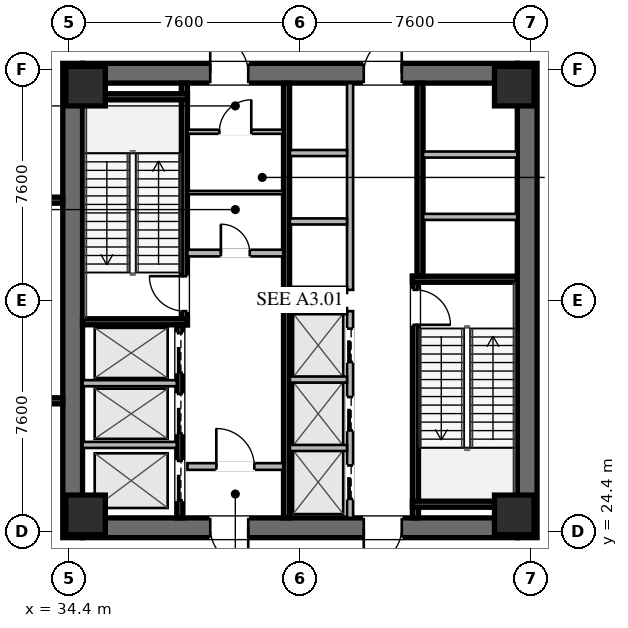
"""IFC4 building model, lengths in metres.
Left out: names, types, materials, properties, quantities, classifications, styles, units other than length and angle.
Written with IfcOpenShell. Run it as: python <this file> out.ifc"""

import sys

from ifc_helpers import new_model, si_unit, direction, frame, frame_2d, origin, origin_2d, place, context, subcontext, project, spatial, rectangle, hollow_rectangle, extrude, element, fill, save


model = new_model("IFC4")
c1 = context("Model", 3, precision=1e-05, world=origin(), true_north=direction((0.0, 1.0)))
c2 = subcontext(c1, "Body", "Model", "MODEL_VIEW")
j1 = project(units=[si_unit("LENGTHUNIT", "METRE"), si_unit("PLANEANGLEUNIT", "RADIAN")], contexts=[c1])
p1 = place(None, origin())
s1 = spatial("IfcSite", under=j1, at=p1, CompositionType="ELEMENT")
p2 = place(p1, origin())
s2 = spatial("IfcBuilding", under=s1, at=p2, CompositionType="ELEMENT")
p3 = place(p2, frame((0.0, 0.0, -11.0)))
s3 = spatial("IfcBuildingStorey", under=s2, at=p3, CompositionType="ELEMENT", Elevation=-11.0)
for number, where, z_axis, x_axis in (
    (1, (34.525, 24.2, 0.0), (0.0, 0.0, 1.0), (0.0, 1.0, 0.0)),
    (2, (49.475, 39.8, 0.0), (0.0, 0.0, 1.0), (0.0, -1.0, 0.0)),
):
    element("IfcWall", number, at=place(p3, frame(where, z_axis=z_axis, x_axis=x_axis)), inside=s3, PredefinedType="SHEAR", context=c2, shape_type="SweptSolid", body=[
        extrude(rectangle(XDim=15.6, YDim=0.65, at=frame_2d((7.8, 0.0))), origin(), (0.0, 0.0, 1.0), 5.5),
    ])
p4 = place(p3, frame((49.15, 24.525, 0.0), z_axis=(0.0, 0.0, 1.0), x_axis=(-1.0, 0.0, 0.0)))
e3 = element("IfcWall", 3, at=p4, inside=s3, PredefinedType="SHEAR", context=c2, shape_type="SweptSolid", body=[
    extrude(rectangle(XDim=14.3, YDim=0.65, at=frame_2d((7.15, 0.0))), origin(), (0.0, 0.0, 1.0), 5.5),
])
p5 = place(p4, frame((8.85, 0.0, 0.0)))
e4 = element("IfcOpeningElement", 4, at=p5, cuts=e3, PredefinedType="OPENING", context=c2, shape_type="SweptSolid", body=[
    extrude(rectangle(XDim=1.25, YDim=2.25, at=frame_2d((0.625, 1.125))), frame((0.0, 0.335, 0.0), z_axis=(0.0, -1.0, 0.0), x_axis=(1.0, 0.0, 0.0)), (0.0, 0.0, 1.0), 0.67),
])
p6 = place(p4, frame((3.8, 0.0, 0.0)))
e5 = element("IfcOpeningElement", 5, at=p6, cuts=e3, PredefinedType="OPENING", context=c2, shape_type="SweptSolid", body=[
    extrude(rectangle(XDim=1.25, YDim=2.25, at=frame_2d((0.625, 1.125))), frame((0.0, 0.335, 0.0), z_axis=(0.0, -1.0, 0.0), x_axis=(1.0, 0.0, 0.0)), (0.0, 0.0, 1.0), 0.67),
])
p7 = place(p3, frame((34.85, 39.475, 0.0), z_axis=(0.0, 0.0, 1.0), x_axis=(1.0, 0.0, 0.0)))
e6 = element("IfcWall", 6, at=p7, inside=s3, PredefinedType="SHEAR", context=c2, shape_type="SweptSolid", body=[
    extrude(rectangle(XDim=14.3, YDim=0.65, at=frame_2d((7.15, 0.0))), origin(), (0.0, 0.0, 1.0), 5.5),
])
p8 = place(p7, frame((4.2, 0.0, 0.0)))
e7 = element("IfcOpeningElement", 7, at=p8, cuts=e6, PredefinedType="OPENING", context=c2, shape_type="SweptSolid", body=[
    extrude(rectangle(XDim=1.25, YDim=2.25, at=frame_2d((0.625, 1.125))), frame((0.0, 0.335, 0.0), z_axis=(0.0, -1.0, 0.0), x_axis=(1.0, 0.0, 0.0)), (0.0, 0.0, 1.0), 0.67),
])
p9 = place(p7, frame((9.25, 0.0, 0.0)))
e8 = element("IfcOpeningElement", 8, at=p9, cuts=e6, PredefinedType="OPENING", context=c2, shape_type="SweptSolid", body=[
    extrude(rectangle(XDim=1.25, YDim=2.25, at=frame_2d((0.625, 1.125))), frame((0.0, 0.335, 0.0), z_axis=(0.0, -1.0, 0.0), x_axis=(1.0, 0.0, 0.0)), (0.0, 0.0, 1.0), 0.67),
])
for number, where, z_axis, x_axis in (
    (9, (34.95, 24.95, 0.0), (0.0, 0.0, 1.0), (1.0, 0.0, 0.0)),
    (10, (49.05, 24.95, 0.0), (0.0, 0.0, 1.0), (1.0, 0.0, 0.0)),
    (11, (49.05, 39.05, 0.0), (0.0, 0.0, 1.0), (1.0, 0.0, 0.0)),
    (12, (34.95, 39.05, 0.0), (0.0, 0.0, 1.0), (1.0, 0.0, 0.0)),
):
    element("IfcColumn", number, at=place(p3, frame(where, z_axis=z_axis, x_axis=x_axis)), inside=s3, PredefinedType="COLUMN", context=c2, shape_type="SweptSolid", body=[
        extrude(hollow_rectangle(XDim=1.3, YDim=1.3, WallThickness=0.05, at=origin_2d()), origin(), (0.0, 0.0, 1.0), 5.24),
    ])
p10 = place(p3, frame((38.2, 31.2, 0.0), z_axis=(0.0, 0.0, 1.0), x_axis=(0.0, 1.0, 0.0)))
e13 = element("IfcWall", 13, at=p10, inside=s3, PredefinedType="SHEAR", context=c2, shape_type="SweptSolid", body=[
    extrude(rectangle(XDim=7.95, YDim=0.2, at=frame_2d((3.975, 0.0))), origin(), (0.0, 0.0, 1.0), 5.24),
])
p11 = place(p10, frame((0.45, 0.0, 0.0)))
e14 = element("IfcOpeningElement", 14, at=p11, cuts=e13, PredefinedType="OPENING", context=c2, shape_type="SweptSolid", body=[
    extrude(rectangle(XDim=1.15, YDim=2.2, at=frame_2d((0.575, 1.1))), frame((0.0, 0.11, 0.0), z_axis=(0.0, -1.0, 0.0), x_axis=(1.0, 0.0, 0.0)), (0.0, 0.0, 1.0), 0.22),
])
for number, where, z_axis, x_axis in (
    (15, (34.85, 31.3, 0.0), (0.0, 0.0, 1.0), (1.0, 0.0, 0.0)),
    (16, (34.85, 38.7, 0.0), (0.0, 0.0, 1.0), (1.0, 0.0, 0.0)),
):
    element("IfcWall", number, at=place(p3, frame(where, z_axis=z_axis, x_axis=x_axis)), inside=s3, PredefinedType="SHEAR", context=c2, shape_type="SweptSolid", body=[
        extrude(rectangle(XDim=3.45, YDim=0.2, at=frame_2d((1.725, 0.0))), origin(), (0.0, 0.0, 1.0), 5.24),
    ])
p12 = place(p3, frame((45.8, 32.8, 0.0), z_axis=(0.0, 0.0, 1.0), x_axis=(0.0, -1.0, 0.0)))
e17 = element("IfcWall", 17, at=p12, inside=s3, PredefinedType="SHEAR", context=c2, shape_type="SweptSolid", body=[
    extrude(rectangle(XDim=7.95, YDim=0.2, at=frame_2d((3.975, 0.0))), origin(), (0.0, 0.0, 1.0), 5.24),
])
p13 = place(p12, frame((0.45, 0.0, 0.0)))
e18 = element("IfcOpeningElement", 18, at=p13, cuts=e17, PredefinedType="OPENING", context=c2, shape_type="SweptSolid", body=[
    extrude(rectangle(XDim=1.15, YDim=2.2, at=frame_2d((0.575, 1.1))), frame((0.0, 0.11, 0.0), z_axis=(0.0, -1.0, 0.0), x_axis=(1.0, 0.0, 0.0)), (0.0, 0.0, 1.0), 0.22),
])
for number, where, z_axis, x_axis in (
    (19, (45.7, 32.7, 0.0), (0.0, 0.0, 1.0), (1.0, 0.0, 0.0)),
    (20, (45.7, 25.3, 0.0), (0.0, 0.0, 1.0), (1.0, 0.0, 0.0)),
):
    element("IfcWall", number, at=place(p3, frame(where, z_axis=z_axis, x_axis=x_axis)), inside=s3, PredefinedType="SHEAR", context=c2, shape_type="SweptSolid", body=[
        extrude(rectangle(XDim=3.45, YDim=0.2, at=frame_2d((1.725, 0.0))), origin(), (0.0, 0.0, 1.0), 5.24),
    ])
p14 = place(p3, frame((41.56, 24.85, 0.0), z_axis=(0.0, 0.0, 1.0), x_axis=(0.0, 1.0, 0.0)))
e21 = element("IfcWall", 21, at=p14, inside=s3, PredefinedType="SHEAR", context=c2, shape_type="SweptSolid", body=[
    extrude(rectangle(XDim=14.3, YDim=0.2, at=frame_2d((7.15, 0.0))), origin(), (0.0, 0.0, 1.0), 5.24),
])
p15 = place(p3, frame((38.3, 33.56, 0.0), z_axis=(0.0, 0.0, 1.0), x_axis=(1.0, 0.0, 0.0)))
e22 = element("IfcWall", 22, at=p15, inside=s3, PredefinedType="SOLIDWALL", context=c2, shape_type="SweptSolid", body=[
    extrude(rectangle(XDim=3.15, YDim=0.22, at=frame_2d((1.575, 0.0))), origin(), (0.0, 0.0, 1.0), 4.283),
])
p16 = place(p15, frame((1.1, 0.0, 0.0)))
e23 = element("IfcOpeningElement", 23, at=p16, cuts=e22, PredefinedType="OPENING", context=c2, shape_type="SweptSolid", body=[
    extrude(rectangle(XDim=0.95, YDim=2.05, at=frame_2d((0.475, 1.025))), frame((0.0, 0.12, 0.0), z_axis=(0.0, -1.0, 0.0), x_axis=(1.0, 0.0, 0.0)), (0.0, 0.0, 1.0), 0.24),
])
p17 = place(p3, frame((38.3, 26.54, 0.0), z_axis=(0.0, 0.0, 1.0), x_axis=(1.0, 0.0, 0.0)))
e24 = element("IfcWall", 24, at=p17, inside=s3, PredefinedType="SOLIDWALL", context=c2, shape_type="SweptSolid", body=[
    extrude(rectangle(XDim=3.15, YDim=0.22, at=frame_2d((1.575, 0.0))), origin(), (0.0, 0.0, 1.0), 4.283),
])
p18 = place(p17, frame((0.95, 0.0, 0.0)))
e25 = element("IfcOpeningElement", 25, at=p18, cuts=e24, PredefinedType="OPENING", context=c2, shape_type="SweptSolid", body=[
    extrude(rectangle(XDim=1.25, YDim=2.25, at=frame_2d((0.625, 1.125))), frame((0.0, 0.12, 0.0), z_axis=(0.0, -1.0, 0.0), x_axis=(1.0, 0.0, 0.0)), (0.0, 0.0, 1.0), 0.24),
])
p19 = place(p3, frame((38.05, 24.85, 0.0), z_axis=(0.0, 0.0, 1.0), x_axis=(0.0, 1.0, 0.0)))
e26 = element("IfcWall", 26, at=p19, inside=s3, PredefinedType="SHEAR", context=c2, shape_type="SweptSolid", body=[
    extrude(rectangle(XDim=6.35, YDim=0.2, at=frame_2d((3.175, 0.0))), origin(), (0.0, 0.0, 1.0), 5.24),
])
p20 = place(p19, frame((4.775, 0.0, 0.0)))
e27 = element("IfcOpeningElement", 27, at=p20, cuts=e26, PredefinedType="OPENING", context=c2, shape_type="SweptSolid", body=[
    extrude(rectangle(XDim=1.3, YDim=2.25, at=frame_2d((0.65, 1.125))), frame((0.0, 0.11, 0.0), z_axis=(0.0, -1.0, 0.0), x_axis=(1.0, 0.0, 0.0)), (0.0, 0.0, 1.0), 0.22),
])
p21 = place(p19, frame((2.775, 0.0, 0.0)))
e28 = element("IfcOpeningElement", 28, at=p21, cuts=e26, PredefinedType="OPENING", context=c2, shape_type="SweptSolid", body=[
    extrude(rectangle(XDim=1.3, YDim=2.25, at=frame_2d((0.65, 1.125))), frame((0.0, 0.11, 0.0), z_axis=(0.0, -1.0, 0.0), x_axis=(1.0, 0.0, 0.0)), (0.0, 0.0, 1.0), 0.22),
])
p22 = place(p19, frame((0.575, 0.0, 0.0)))
e29 = element("IfcOpeningElement", 29, at=p22, cuts=e26, PredefinedType="OPENING", context=c2, shape_type="SweptSolid", body=[
    extrude(rectangle(XDim=1.3, YDim=2.25, at=frame_2d((0.65, 1.125))), frame((0.0, 0.11, 0.0), z_axis=(0.0, -1.0, 0.0), x_axis=(1.0, 0.0, 0.0)), (0.0, 0.0, 1.0), 0.22),
])
for number, where, z_axis, x_axis in (
    (30, (34.85, 27.25, 0.0), (0.0, 0.0, 1.0), (1.0, 0.0, 0.0)),
    (31, (34.85, 29.28, 0.0), (0.0, 0.0, 1.0), (1.0, 0.0, 0.0)),
):
    element("IfcWall", number, at=place(p3, frame(where, z_axis=z_axis, x_axis=x_axis)), inside=s3, PredefinedType="SOLIDWALL", context=c2, shape_type="SweptSolid", body=[
        extrude(rectangle(XDim=3.1, YDim=0.2, at=frame_2d((1.55, 0.0))), origin(), (0.0, 0.0, 1.0), 5.24),
    ])
p23 = place(p3, frame((45.95, 39.15, 0.0), z_axis=(0.0, 0.0, 1.0), x_axis=(0.0, -1.0, 0.0)))
e32 = element("IfcWall", 32, at=p23, inside=s3, PredefinedType="SHEAR", context=c2, shape_type="SweptSolid", body=[
    extrude(rectangle(XDim=6.35, YDim=0.2, at=frame_2d((3.175, 0.0))), origin(), (0.0, 0.0, 1.0), 5.24),
])
for number, where, z_axis, x_axis in (
    (33, (46.05, 34.75, 0.0), (0.0, 0.0, 1.0), (1.0, 0.0, 0.0)),
    (34, (46.05, 36.8, 0.0), (0.0, 0.0, 1.0), (1.0, 0.0, 0.0)),
):
    element("IfcWall", number, at=place(p3, frame(where, z_axis=z_axis, x_axis=x_axis)), inside=s3, PredefinedType="SOLIDWALL", context=c2, shape_type="SweptSolid", body=[
        extrude(rectangle(XDim=3.1, YDim=0.2, at=frame_2d((1.55, 0.0))), origin(), (0.0, 0.0, 1.0), 5.24),
    ])
p24 = place(p3, frame((38.3, 37.55, 0.0), z_axis=(0.0, 0.0, 1.0), x_axis=(1.0, 0.0, 0.0)))
e35 = element("IfcWall", 35, at=p24, inside=s3, PredefinedType="PARTITIONING", context=c2, shape_type="SweptSolid", body=[
    extrude(rectangle(XDim=3.15, YDim=0.135, at=frame_2d((1.575, 0.0))), origin(), (0.0, 0.0, 1.0), 4.283),
])
p25 = place(p24, frame((1.05, 0.0, 0.0)))
e36 = element("IfcOpeningElement", 36, at=p25, cuts=e35, PredefinedType="OPENING", context=c2, shape_type="SweptSolid", body=[
    extrude(rectangle(XDim=1.05, YDim=2.2, at=frame_2d((0.525, 1.1))), frame((0.0, 0.077, 0.0), z_axis=(0.0, -1.0, 0.0), x_axis=(1.0, 0.0, 0.0)), (0.0, 0.0, 1.0), 0.155),
])
p26 = place(p3, frame((38.3, 35.55, 0.0), z_axis=(0.0, 0.0, 1.0), x_axis=(1.0, 0.0, 0.0)))
e37 = element("IfcWall", 37, at=p26, inside=s3, PredefinedType="PARTITIONING", context=c2, shape_type="SweptSolid", body=[
    extrude(rectangle(XDim=3.15, YDim=0.11, at=frame_2d((1.575, 0.0))), origin(), (0.0, 0.0, 1.0), 4.283),
])
p27 = place(p3, frame((43.65, 24.85, 0.0), z_axis=(0.0, 0.0, 1.0), x_axis=(0.0, 1.0, 0.0)))
e38 = element("IfcWall", 38, at=p27, inside=s3, PredefinedType="SOLIDWALL", context=c2, shape_type="SweptSolid", body=[
    extrude(rectangle(XDim=6.8, YDim=0.2, at=frame_2d((3.4, 0.0))), origin(), (0.0, 0.0, 1.0), 5.24),
])
p28 = place(p27, frame((0.625, 0.0, 0.0)))
e39 = element("IfcOpeningElement", 39, at=p28, cuts=e38, PredefinedType="OPENING", context=c2, shape_type="SweptSolid", body=[
    extrude(rectangle(XDim=1.1, YDim=2.2, at=frame_2d((0.55, 1.1))), frame((0.0, 0.11, 0.0), z_axis=(0.0, -1.0, 0.0), x_axis=(1.0, 0.0, 0.0)), (0.0, 0.0, 1.0), 0.22),
])
p29 = place(p27, frame((2.875, 0.0, 0.0)))
e40 = element("IfcOpeningElement", 40, at=p29, cuts=e38, PredefinedType="OPENING", context=c2, shape_type="SweptSolid", body=[
    extrude(rectangle(XDim=1.1, YDim=2.2, at=frame_2d((0.55, 1.1))), frame((0.0, 0.11, 0.0), z_axis=(0.0, -1.0, 0.0), x_axis=(1.0, 0.0, 0.0)), (0.0, 0.0, 1.0), 0.22),
])
p30 = place(p27, frame((5.125, 0.0, 0.0)))
e41 = element("IfcOpeningElement", 41, at=p30, cuts=e38, PredefinedType="OPENING", context=c2, shape_type="SweptSolid", body=[
    extrude(rectangle(XDim=1.1, YDim=2.2, at=frame_2d((0.55, 1.1))), frame((0.0, 0.11, 0.0), z_axis=(0.0, -1.0, 0.0), x_axis=(1.0, 0.0, 0.0)), (0.0, 0.0, 1.0), 0.22),
])
for number, where, z_axis, x_axis in (
    (42, (41.67, 27.15, 0.0), (0.0, 0.0, 1.0), (1.0, 0.0, 0.0)),
    (43, (41.67, 29.4, 0.0), (0.0, 0.0, 1.0), (1.0, 0.0, 0.0)),
    (44, (41.67, 31.65, 0.0), (0.0, 0.0, 1.0), (1.0, 0.0, 0.0)),
):
    element("IfcWall", number, at=place(p3, frame(where, z_axis=z_axis, x_axis=x_axis)), inside=s3, PredefinedType="SOLIDWALL", context=c2, shape_type="SweptSolid", body=[
        extrude(rectangle(XDim=1.88, YDim=0.2, at=frame_2d((0.94, 0.0))), origin(), (0.0, 0.0, 1.0), 5.24),
    ])
p31 = place(p3, frame((43.65, 32.35, 0.0), z_axis=(0.0, 0.0, 1.0), x_axis=(0.0, 1.0, 0.0)))
e45 = element("IfcWall", 45, at=p31, inside=s3, PredefinedType="SOLIDWALL", context=c2, shape_type="SweptSolid", body=[
    extrude(rectangle(XDim=6.8, YDim=0.2, at=frame_2d((3.4, 0.0))), origin(), (0.0, 0.0, 1.0), 5.24),
])
for number, where, z_axis, x_axis in (
    (46, (41.67, 32.35, 0.0), (0.0, 0.0, 1.0), (1.0, 0.0, 0.0)),
    (47, (41.67, 34.6, 0.0), (0.0, 0.0, 1.0), (1.0, 0.0, 0.0)),
    (48, (41.67, 36.85, 0.0), (0.0, 0.0, 1.0), (1.0, 0.0, 0.0)),
):
    element("IfcWall", number, at=place(p3, frame(where, z_axis=z_axis, x_axis=x_axis)), inside=s3, PredefinedType="SOLIDWALL", context=c2, shape_type="SweptSolid", body=[
        extrude(rectangle(XDim=1.88, YDim=0.2, at=frame_2d((0.94, 0.0))), origin(), (0.0, 0.0, 1.0), 5.24),
    ])
for number, where, z_axis, x_axis in (
    (49, (30.8, 35.3, 0.0), (0.0, 0.0, 1.0), (1.0, 0.0, 0.0)),
    (50, (30.8, 28.7, 0.0), (0.0, 0.0, 1.0), (1.0, 0.0, 0.0)),
):
    element("IfcWall", number, at=place(p3, frame(where, z_axis=z_axis, x_axis=x_axis)), inside=s3, PredefinedType="SHEAR", context=c2, shape_type="SweptSolid", body=[
        extrude(rectangle(XDim=3.4, YDim=0.2, at=frame_2d((1.7, 0.0))), origin(), (0.0, 0.0, 1.0), 5.24),
    ])
p32 = place(p8, origin())
e51 = element("IfcDoor", 51, at=p32, inside=s3, OperationType="SINGLE_SWING_LEFT", PredefinedType="DOOR", context=c2, shape_type="SweptSolid", body=[
    extrude(rectangle(XDim=1.25, YDim=2.25, at=frame_2d((0.625, 1.125))), frame((0.0, 0.025, 0.0), z_axis=(0.0, -1.0, 0.0), x_axis=(1.0, 0.0, 0.0)), (0.0, 0.0, 1.0), 0.05),
])
fill(e7, e51)
p33 = place(p9, origin())
e52 = element("IfcDoor", 52, at=p33, inside=s3, OperationType="SINGLE_SWING_RIGHT", PredefinedType="DOOR", context=c2, shape_type="SweptSolid", body=[
    extrude(rectangle(XDim=1.25, YDim=2.25, at=frame_2d((0.625, 1.125))), frame((0.0, 0.025, 0.0), z_axis=(0.0, -1.0, 0.0), x_axis=(1.0, 0.0, 0.0)), (0.0, 0.0, 1.0), 0.05),
])
fill(e8, e52)
p34 = place(p5, origin())
e53 = element("IfcDoor", 53, at=p34, inside=s3, OperationType="SINGLE_SWING_LEFT", PredefinedType="DOOR", context=c2, shape_type="SweptSolid", body=[
    extrude(rectangle(XDim=1.25, YDim=2.25, at=frame_2d((0.625, 1.125))), frame((0.0, 0.025, 0.0), z_axis=(0.0, -1.0, 0.0), x_axis=(1.0, 0.0, 0.0)), (0.0, 0.0, 1.0), 0.05),
])
fill(e4, e53)
p35 = place(p6, origin())
e54 = element("IfcDoor", 54, at=p35, inside=s3, OperationType="SINGLE_SWING_RIGHT", PredefinedType="DOOR", context=c2, shape_type="SweptSolid", body=[
    extrude(rectangle(XDim=1.25, YDim=2.25, at=frame_2d((0.625, 1.125))), frame((0.0, 0.025, 0.0), z_axis=(0.0, -1.0, 0.0), x_axis=(1.0, 0.0, 0.0)), (0.0, 0.0, 1.0), 0.05),
])
fill(e5, e54)
p36 = place(p11, origin())
e55 = element("IfcDoor", 55, at=p36, inside=s3, OperationType="SINGLE_SWING_RIGHT", PredefinedType="DOOR", context=c2, shape_type="SweptSolid", body=[
    extrude(rectangle(XDim=1.15, YDim=2.2, at=frame_2d((0.575, 1.1))), frame((0.0, 0.025, 0.0), z_axis=(0.0, -1.0, 0.0), x_axis=(1.0, 0.0, 0.0)), (0.0, 0.0, 1.0), 0.05),
])
fill(e14, e55)
p37 = place(p13, origin())
e56 = element("IfcDoor", 56, at=p37, inside=s3, OperationType="SINGLE_SWING_RIGHT", PredefinedType="DOOR", context=c2, shape_type="SweptSolid", body=[
    extrude(rectangle(XDim=1.15, YDim=2.2, at=frame_2d((0.575, 1.1))), frame((0.0, 0.025, 0.0), z_axis=(0.0, -1.0, 0.0), x_axis=(1.0, 0.0, 0.0)), (0.0, 0.0, 1.0), 0.05),
])
fill(e18, e56)
p38 = place(p18, origin())
e57 = element("IfcDoor", 57, at=p38, inside=s3, OperationType="SINGLE_SWING_LEFT", PredefinedType="DOOR", context=c2, shape_type="SweptSolid", body=[
    extrude(rectangle(XDim=1.25, YDim=2.25, at=frame_2d((0.625, 1.125))), frame((0.0, 0.025, 0.0), z_axis=(0.0, -1.0, 0.0), x_axis=(1.0, 0.0, 0.0)), (0.0, 0.0, 1.0), 0.05),
])
fill(e25, e57)
p39 = place(p25, origin())
e58 = element("IfcDoor", 58, at=p39, inside=s3, OperationType="SINGLE_SWING_RIGHT", PredefinedType="DOOR", context=c2, shape_type="SweptSolid", body=[
    extrude(rectangle(XDim=1.05, YDim=2.2, at=frame_2d((0.525, 1.1))), frame((0.0, 0.025, 0.0), z_axis=(0.0, -1.0, 0.0), x_axis=(1.0, 0.0, 0.0)), (0.0, 0.0, 1.0), 0.05),
])
fill(e36, e58)
p40 = place(p16, origin())
e59 = element("IfcDoor", 59, at=p40, inside=s3, OperationType="SINGLE_SWING_LEFT", PredefinedType="DOOR", context=c2, shape_type="SweptSolid", body=[
    extrude(rectangle(XDim=0.95, YDim=2.05, at=frame_2d((0.475, 1.025))), frame((0.0, 0.025, 0.0), z_axis=(0.0, -1.0, 0.0), x_axis=(1.0, 0.0, 0.0)), (0.0, 0.0, 1.0), 0.05),
])
fill(e23, e59)
p41 = place(p20, origin())
e60 = element("IfcDoor", 60, at=p41, inside=s3, OperationType="SLIDING_TO_LEFT", PredefinedType="DOOR", context=c2, shape_type="SweptSolid", body=[
    extrude(rectangle(XDim=1.3, YDim=2.25, at=frame_2d((0.65, 1.125))), frame((0.0, 0.025, 0.0), z_axis=(0.0, -1.0, 0.0), x_axis=(1.0, 0.0, 0.0)), (0.0, 0.0, 1.0), 0.05),
])
fill(e27, e60)
p42 = place(p21, origin())
e61 = element("IfcDoor", 61, at=p42, inside=s3, OperationType="SLIDING_TO_LEFT", PredefinedType="DOOR", context=c2, shape_type="SweptSolid", body=[
    extrude(rectangle(XDim=1.3, YDim=2.25, at=frame_2d((0.65, 1.125))), frame((0.0, 0.025, 0.0), z_axis=(0.0, -1.0, 0.0), x_axis=(1.0, 0.0, 0.0)), (0.0, 0.0, 1.0), 0.05),
])
fill(e28, e61)
p43 = place(p22, origin())
e62 = element("IfcDoor", 62, at=p43, inside=s3, OperationType="SLIDING_TO_LEFT", PredefinedType="DOOR", context=c2, shape_type="SweptSolid", body=[
    extrude(rectangle(XDim=1.3, YDim=2.25, at=frame_2d((0.65, 1.125))), frame((0.0, 0.025, 0.0), z_axis=(0.0, -1.0, 0.0), x_axis=(1.0, 0.0, 0.0)), (0.0, 0.0, 1.0), 0.05),
])
fill(e29, e62)
p44 = place(p28, origin())
e63 = element("IfcDoor", 63, at=p44, inside=s3, OperationType="SLIDING_TO_LEFT", PredefinedType="DOOR", context=c2, shape_type="SweptSolid", body=[
    extrude(rectangle(XDim=1.1, YDim=2.2, at=frame_2d((0.55, 1.1))), frame((0.0, 0.025, 0.0), z_axis=(0.0, -1.0, 0.0), x_axis=(1.0, 0.0, 0.0)), (0.0, 0.0, 1.0), 0.05),
])
fill(e39, e63)
p45 = place(p29, origin())
e64 = element("IfcDoor", 64, at=p45, inside=s3, OperationType="SLIDING_TO_LEFT", PredefinedType="DOOR", context=c2, shape_type="SweptSolid", body=[
    extrude(rectangle(XDim=1.1, YDim=2.2, at=frame_2d((0.55, 1.1))), frame((0.0, 0.025, 0.0), z_axis=(0.0, -1.0, 0.0), x_axis=(1.0, 0.0, 0.0)), (0.0, 0.0, 1.0), 0.05),
])
fill(e40, e64)
p46 = place(p30, origin())
e65 = element("IfcDoor", 65, at=p46, inside=s3, OperationType="SLIDING_TO_LEFT", PredefinedType="DOOR", context=c2, shape_type="SweptSolid", body=[
    extrude(rectangle(XDim=1.1, YDim=2.2, at=frame_2d((0.55, 1.1))), frame((0.0, 0.025, 0.0), z_axis=(0.0, -1.0, 0.0), x_axis=(1.0, 0.0, 0.0)), (0.0, 0.0, 1.0), 0.05),
])
fill(e41, e65)
save(model, sys.argv[1])
